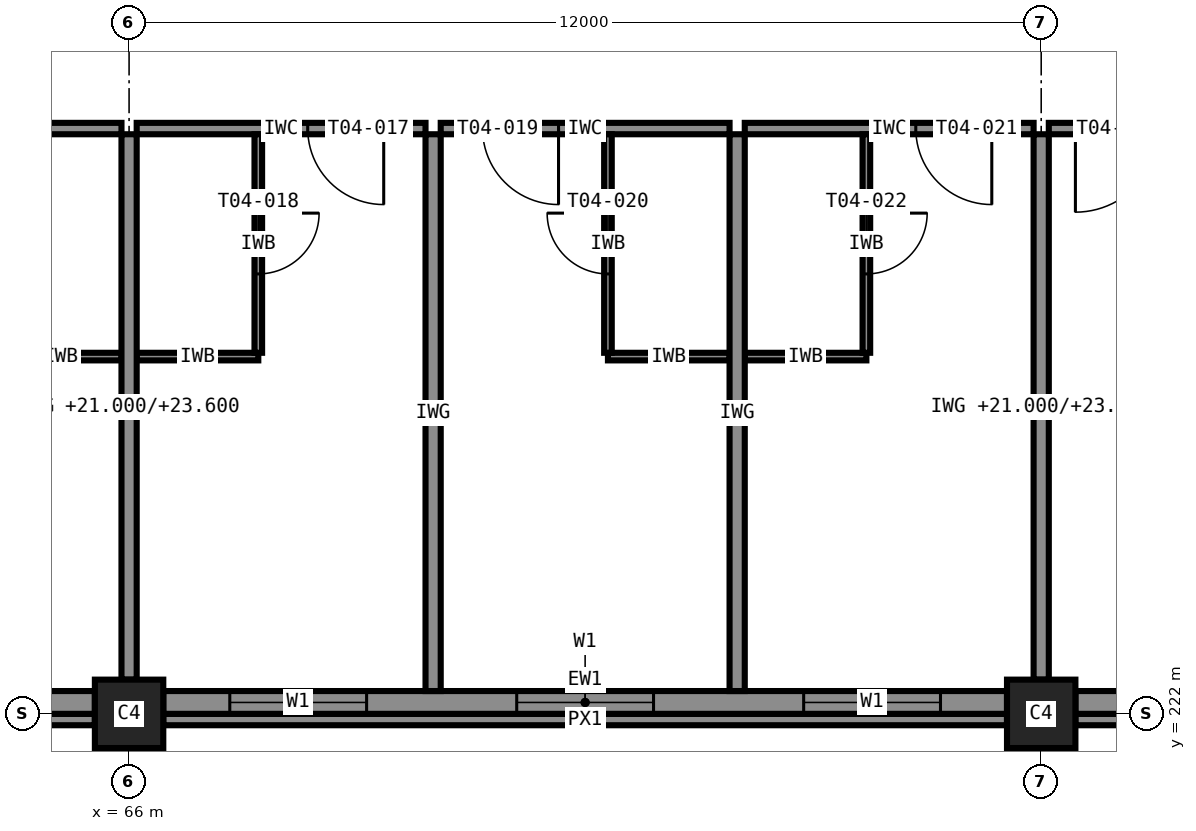
"""IFC4 building model, lengths in metres.
Left out: names, types, materials, properties, quantities, classifications, styles, units other than length and angle.
Written with IfcOpenShell. Run it as: python <this file> out.ifc"""

import sys

from ifc_helpers import new_model, si_unit, direction, frame, frame_2d, origin, origin_2d, place, context, subcontext, project, spatial, rectangle, extrude, element, fill, save


model = new_model("IFC4")
c1 = context("Model", 3, precision=1e-05, world=origin(), true_north=direction((0.0, 1.0)))
c2 = subcontext(c1, "Body", "Model", "MODEL_VIEW")
j1 = project(units=[si_unit("LENGTHUNIT", "METRE"), si_unit("PLANEANGLEUNIT", "RADIAN")], contexts=[c1])
p1 = place(None, origin())
s1 = spatial("IfcSite", under=j1, at=p1, CompositionType="ELEMENT")
p2 = place(p1, origin())
s2 = spatial("IfcBuilding", under=s1, at=p2, CompositionType="ELEMENT")
p3 = place(p2, frame((0.0, 0.0, 21.0)))
s3 = spatial("IfcBuildingStorey", under=s2, at=p3, CompositionType="ELEMENT", Elevation=21.0)
for number, where, z_axis, x_axis in (
    (1, (66.0, 222.0, 0.0), (0.0, 0.0, 1.0), (1.0, 0.0, 0.0)),
    (2, (78.0, 222.0, 0.0), (0.0, 0.0, 1.0), (1.0, 0.0, 0.0)),
):
    element("IfcColumn", number, at=place(p3, frame(where, z_axis=z_axis, x_axis=x_axis)), inside=s3, PredefinedType="COLUMN", context=c2, shape_type="SweptSolid", body=[
        extrude(rectangle(XDim=0.9, YDim=0.9, at=origin_2d()), origin(), (0.0, 0.0, 1.0), 3.6),
    ])
p4 = place(p3, frame((54.45, 222.15, 0.0), z_axis=(0.0, 0.0, 1.0), x_axis=(1.0, 0.0, 0.0)))
e3 = element("IfcWall", 3, at=p4, inside=s3, PredefinedType="STANDARD", context=c2, shape_type="SweptSolid", body=[
    extrude(rectangle(XDim=11.1, YDim=0.3, at=frame_2d((5.55, 0.0))), origin(), (0.0, 0.0, 1.0), 2.6),
])
p5 = place(p4, frame((0.875, 0.0, 0.85)))
e4 = element("IfcOpeningElement", 4, at=p5, cuts=e3, PredefinedType="OPENING", context=c2, shape_type="SweptSolid", body=[
    extrude(rectangle(XDim=1.8, YDim=1.75, at=frame_2d((0.9, 0.875))), frame((0.0, 0.16, 0.0), z_axis=(0.0, -1.0, 0.0), x_axis=(1.0, 0.0, 0.0)), (0.0, 0.0, 1.0), 0.32),
])
p6 = place(p4, frame((4.65, 0.0, 0.85)))
e5 = element("IfcOpeningElement", 5, at=p6, cuts=e3, PredefinedType="OPENING", context=c2, shape_type="SweptSolid", body=[
    extrude(rectangle(XDim=1.8, YDim=1.75, at=frame_2d((0.9, 0.875))), frame((0.0, 0.16, 0.0), z_axis=(0.0, -1.0, 0.0), x_axis=(1.0, 0.0, 0.0)), (0.0, 0.0, 1.0), 0.32),
])
p7 = place(p4, frame((8.425, 0.0, 0.85)))
e6 = element("IfcOpeningElement", 6, at=p7, cuts=e3, PredefinedType="OPENING", context=c2, shape_type="SweptSolid", body=[
    extrude(rectangle(XDim=1.8, YDim=1.75, at=frame_2d((0.9, 0.875))), frame((0.0, 0.16, 0.0), z_axis=(0.0, -1.0, 0.0), x_axis=(1.0, 0.0, 0.0)), (0.0, 0.0, 1.0), 0.32),
])
p8 = place(p3, frame((66.45, 222.15, 0.0), z_axis=(0.0, 0.0, 1.0), x_axis=(1.0, 0.0, 0.0)))
e7 = element("IfcWall", 7, at=p8, inside=s3, PredefinedType="STANDARD", context=c2, shape_type="SweptSolid", body=[
    extrude(rectangle(XDim=11.1, YDim=0.3, at=frame_2d((5.55, 0.0))), origin(), (0.0, 0.0, 1.0), 2.6),
])
p9 = place(p8, frame((0.875, 0.0, 0.85)))
e8 = element("IfcOpeningElement", 8, at=p9, cuts=e7, PredefinedType="OPENING", context=c2, shape_type="SweptSolid", body=[
    extrude(rectangle(XDim=1.8, YDim=1.75, at=frame_2d((0.9, 0.875))), frame((0.0, 0.16, 0.0), z_axis=(0.0, -1.0, 0.0), x_axis=(1.0, 0.0, 0.0)), (0.0, 0.0, 1.0), 0.32),
])
p10 = place(p8, frame((4.65, 0.0, 0.85)))
e9 = element("IfcOpeningElement", 9, at=p10, cuts=e7, PredefinedType="OPENING", context=c2, shape_type="SweptSolid", body=[
    extrude(rectangle(XDim=1.8, YDim=1.75, at=frame_2d((0.9, 0.875))), frame((0.0, 0.16, 0.0), z_axis=(0.0, -1.0, 0.0), x_axis=(1.0, 0.0, 0.0)), (0.0, 0.0, 1.0), 0.32),
])
p11 = place(p8, frame((8.425, 0.0, 0.85)))
e10 = element("IfcOpeningElement", 10, at=p11, cuts=e7, PredefinedType="OPENING", context=c2, shape_type="SweptSolid", body=[
    extrude(rectangle(XDim=1.8, YDim=1.75, at=frame_2d((0.9, 0.875))), frame((0.0, 0.16, 0.0), z_axis=(0.0, -1.0, 0.0), x_axis=(1.0, 0.0, 0.0)), (0.0, 0.0, 1.0), 0.32),
])
p12 = place(p3, frame((78.45, 222.15, 0.0), z_axis=(0.0, 0.0, 1.0), x_axis=(1.0, 0.0, 0.0)))
e11 = element("IfcWall", 11, at=p12, inside=s3, PredefinedType="STANDARD", context=c2, shape_type="SweptSolid", body=[
    extrude(rectangle(XDim=11.1, YDim=0.3, at=frame_2d((5.55, 0.0))), origin(), (0.0, 0.0, 1.0), 2.6),
])
p13 = place(p12, frame((1.075, 0.0, 0.85)))
e12 = element("IfcOpeningElement", 12, at=p13, cuts=e11, PredefinedType="OPENING", context=c2, shape_type="SweptSolid", body=[
    extrude(rectangle(XDim=1.8, YDim=1.75, at=frame_2d((0.9, 0.875))), frame((0.0, 0.16, 0.0), z_axis=(0.0, -1.0, 0.0), x_axis=(1.0, 0.0, 0.0)), (0.0, 0.0, 1.0), 0.32),
])
p14 = place(p12, frame((4.85, 0.0, 0.85)))
e13 = element("IfcOpeningElement", 13, at=p14, cuts=e11, PredefinedType="OPENING", context=c2, shape_type="SweptSolid", body=[
    extrude(rectangle(XDim=1.8, YDim=1.75, at=frame_2d((0.9, 0.875))), frame((0.0, 0.16, 0.0), z_axis=(0.0, -1.0, 0.0), x_axis=(1.0, 0.0, 0.0)), (0.0, 0.0, 1.0), 0.32),
])
for number, where, z_axis, x_axis in (
    (14, (54.45, 221.925, 3.4), (0.0, 0.0, 1.0), (1.0, 0.0, 0.0)),
    (15, (66.45, 221.925, 3.4), (0.0, 0.0, 1.0), (1.0, 0.0, 0.0)),
    (16, (78.45, 221.925, 3.4), (0.0, 0.0, 1.0), (1.0, 0.0, 0.0)),
):
    element("IfcWall", number, at=place(p3, frame(where, z_axis=z_axis, x_axis=x_axis)), inside=s3, PredefinedType="STANDARD", context=c2, shape_type="SweptSolid", body=[
        extrude(rectangle(XDim=11.1, YDim=0.15, at=frame_2d((5.55, 0.0))), origin(), (0.0, 0.0, 1.0), 0.2),
    ])
p15 = place(p3, frame((65.9, 229.7, 0.0), z_axis=(0.0, 0.0, 1.0), x_axis=(-1.0, 0.0, 0.0)))
e17 = element("IfcWall", 17, at=p15, inside=s3, PredefinedType="PARTITIONING", context=c2, shape_type="SweptSolid", body=[
    extrude(rectangle(XDim=3.8, YDim=0.15, at=frame_2d((1.9, 0.0))), origin(), (0.0, 0.0, 1.0), 3.4),
])
p16 = place(p15, frame((2.25, 0.0, 0.0)))
e18 = element("IfcOpeningElement", 18, at=p16, cuts=e17, PredefinedType="OPENING", context=c2, shape_type="SweptSolid", body=[
    extrude(rectangle(XDim=1.0, YDim=2.1, at=frame_2d((0.5, 1.05))), frame((0.0, 0.085, 0.0), z_axis=(0.0, -1.0, 0.0), x_axis=(1.0, 0.0, 0.0)), (0.0, 0.0, 1.0), 0.17),
])
p17 = place(p3, frame((64.3, 226.7, 0.0), z_axis=(0.0, 0.0, 1.0), x_axis=(1.0, 0.0, 0.0)))
e19 = element("IfcWall", 19, at=p17, inside=s3, PredefinedType="PARTITIONING", context=c2, shape_type="SweptSolid", body=[
    extrude(rectangle(XDim=1.6, YDim=0.1, at=frame_2d((0.8, 0.0))), origin(), (0.0, 0.0, 1.0), 3.4),
])
p18 = place(p3, frame((69.9, 229.7, 0.0), z_axis=(0.0, 0.0, 1.0), x_axis=(-1.0, 0.0, 0.0)))
e20 = element("IfcWall", 20, at=p18, inside=s3, PredefinedType="PARTITIONING", context=c2, shape_type="SweptSolid", body=[
    extrude(rectangle(XDim=3.8, YDim=0.15, at=frame_2d((1.9, 0.0))), origin(), (0.0, 0.0, 1.0), 3.4),
])
p19 = place(p18, frame((0.55, 0.0, 0.0)))
e21 = element("IfcOpeningElement", 21, at=p19, cuts=e20, PredefinedType="OPENING", context=c2, shape_type="SweptSolid", body=[
    extrude(rectangle(XDim=1.0, YDim=2.1, at=frame_2d((0.5, 1.05))), frame((0.0, 0.085, 0.0), z_axis=(0.0, -1.0, 0.0), x_axis=(1.0, 0.0, 0.0)), (0.0, 0.0, 1.0), 0.17),
])
p20 = place(p3, frame((66.1, 226.7, 0.0), z_axis=(0.0, 0.0, 1.0), x_axis=(1.0, 0.0, 0.0)))
e22 = element("IfcWall", 22, at=p20, inside=s3, PredefinedType="PARTITIONING", context=c2, shape_type="SweptSolid", body=[
    extrude(rectangle(XDim=1.6, YDim=0.1, at=frame_2d((0.8, 0.0))), origin(), (0.0, 0.0, 1.0), 3.4),
])
p21 = place(p3, frame((67.7, 229.625, 0.0), z_axis=(0.0, 0.0, 1.0), x_axis=(0.0, -1.0, 0.0)))
e23 = element("IfcWall", 23, at=p21, inside=s3, PredefinedType="PARTITIONING", context=c2, shape_type="SweptSolid", body=[
    extrude(rectangle(XDim=2.875, YDim=0.1, at=frame_2d((1.438, 0.0))), origin(), (0.0, 0.0, 1.0), 3.4),
])
p22 = place(p21, frame((1.038, 0.0, 0.0)))
e24 = element("IfcOpeningElement", 24, at=p22, cuts=e23, PredefinedType="OPENING", context=c2, shape_type="SweptSolid", body=[
    extrude(rectangle(XDim=0.8, YDim=2.1, at=frame_2d((0.4, 1.05))), frame((0.0, 0.06, 0.0), z_axis=(0.0, -1.0, 0.0), x_axis=(1.0, 0.0, 0.0)), (0.0, 0.0, 1.0), 0.12),
])
p23 = place(p3, frame((73.9, 229.7, 0.0), z_axis=(0.0, 0.0, 1.0), x_axis=(-1.0, 0.0, 0.0)))
e25 = element("IfcWall", 25, at=p23, inside=s3, PredefinedType="PARTITIONING", context=c2, shape_type="SweptSolid", body=[
    extrude(rectangle(XDim=3.8, YDim=0.15, at=frame_2d((1.9, 0.0))), origin(), (0.0, 0.0, 1.0), 3.4),
])
p24 = place(p23, frame((2.25, 0.0, 0.0)))
e26 = element("IfcOpeningElement", 26, at=p24, cuts=e25, PredefinedType="OPENING", context=c2, shape_type="SweptSolid", body=[
    extrude(rectangle(XDim=1.0, YDim=2.1, at=frame_2d((0.5, 1.05))), frame((0.0, 0.085, 0.0), z_axis=(0.0, -1.0, 0.0), x_axis=(1.0, 0.0, 0.0)), (0.0, 0.0, 1.0), 0.17),
])
p25 = place(p3, frame((72.3, 226.7, 0.0), z_axis=(0.0, 0.0, 1.0), x_axis=(1.0, 0.0, 0.0)))
e27 = element("IfcWall", 27, at=p25, inside=s3, PredefinedType="PARTITIONING", context=c2, shape_type="SweptSolid", body=[
    extrude(rectangle(XDim=1.6, YDim=0.1, at=frame_2d((0.8, 0.0))), origin(), (0.0, 0.0, 1.0), 3.4),
])
p26 = place(p3, frame((72.3, 226.75, 0.0), z_axis=(0.0, 0.0, 1.0), x_axis=(0.0, 1.0, 0.0)))
e28 = element("IfcWall", 28, at=p26, inside=s3, PredefinedType="PARTITIONING", context=c2, shape_type="SweptSolid", body=[
    extrude(rectangle(XDim=2.875, YDim=0.1, at=frame_2d((1.438, 0.0))), origin(), (0.0, 0.0, 1.0), 3.4),
])
p27 = place(p26, frame((1.038, 0.0, 0.0)))
e29 = element("IfcOpeningElement", 29, at=p27, cuts=e28, PredefinedType="OPENING", context=c2, shape_type="SweptSolid", body=[
    extrude(rectangle(XDim=0.8, YDim=2.1, at=frame_2d((0.4, 1.05))), frame((0.0, 0.06, 0.0), z_axis=(0.0, -1.0, 0.0), x_axis=(1.0, 0.0, 0.0)), (0.0, 0.0, 1.0), 0.12),
])
p28 = place(p3, frame((77.9, 229.7, 0.0), z_axis=(0.0, 0.0, 1.0), x_axis=(-1.0, 0.0, 0.0)))
e30 = element("IfcWall", 30, at=p28, inside=s3, PredefinedType="PARTITIONING", context=c2, shape_type="SweptSolid", body=[
    extrude(rectangle(XDim=3.8, YDim=0.15, at=frame_2d((1.9, 0.0))), origin(), (0.0, 0.0, 1.0), 3.4),
])
p29 = place(p28, frame((0.55, 0.0, 0.0)))
e31 = element("IfcOpeningElement", 31, at=p29, cuts=e30, PredefinedType="OPENING", context=c2, shape_type="SweptSolid", body=[
    extrude(rectangle(XDim=1.0, YDim=2.1, at=frame_2d((0.5, 1.05))), frame((0.0, 0.085, 0.0), z_axis=(0.0, -1.0, 0.0), x_axis=(1.0, 0.0, 0.0)), (0.0, 0.0, 1.0), 0.17),
])
p30 = place(p3, frame((74.1, 226.7, 0.0), z_axis=(0.0, 0.0, 1.0), x_axis=(1.0, 0.0, 0.0)))
e32 = element("IfcWall", 32, at=p30, inside=s3, PredefinedType="PARTITIONING", context=c2, shape_type="SweptSolid", body=[
    extrude(rectangle(XDim=1.6, YDim=0.1, at=frame_2d((0.8, 0.0))), origin(), (0.0, 0.0, 1.0), 3.4),
])
p31 = place(p3, frame((75.7, 229.625, 0.0), z_axis=(0.0, 0.0, 1.0), x_axis=(0.0, -1.0, 0.0)))
e33 = element("IfcWall", 33, at=p31, inside=s3, PredefinedType="PARTITIONING", context=c2, shape_type="SweptSolid", body=[
    extrude(rectangle(XDim=2.875, YDim=0.1, at=frame_2d((1.438, 0.0))), origin(), (0.0, 0.0, 1.0), 3.4),
])
p32 = place(p31, frame((1.038, 0.0, 0.0)))
e34 = element("IfcOpeningElement", 34, at=p32, cuts=e33, PredefinedType="OPENING", context=c2, shape_type="SweptSolid", body=[
    extrude(rectangle(XDim=0.8, YDim=2.1, at=frame_2d((0.4, 1.05))), frame((0.0, 0.06, 0.0), z_axis=(0.0, -1.0, 0.0), x_axis=(1.0, 0.0, 0.0)), (0.0, 0.0, 1.0), 0.12),
])
p33 = place(p3, frame((82.3, 229.7, 0.0), z_axis=(0.0, 0.0, 1.0), x_axis=(-1.0, 0.0, 0.0)))
e35 = element("IfcWall", 35, at=p33, inside=s3, PredefinedType="PARTITIONING", context=c2, shape_type="SweptSolid", body=[
    extrude(rectangle(XDim=4.2, YDim=0.15, at=frame_2d((2.1, 0.0))), origin(), (0.0, 0.0, 1.0), 3.4),
])
p34 = place(p33, frame((2.75, 0.0, 0.0)))
e36 = element("IfcOpeningElement", 36, at=p34, cuts=e35, PredefinedType="OPENING", context=c2, shape_type="SweptSolid", body=[
    extrude(rectangle(XDim=1.1, YDim=2.1, at=frame_2d((0.55, 1.05))), frame((0.0, 0.085, 0.0), z_axis=(0.0, -1.0, 0.0), x_axis=(1.0, 0.0, 0.0)), (0.0, 0.0, 1.0), 0.17),
])
p35 = place(p3, frame((66.0, 222.45, 0.0), z_axis=(0.0, 0.0, 1.0), x_axis=(0.0, 1.0, 0.0)))
e37 = element("IfcWall", 37, at=p35, inside=s3, PredefinedType="PARTITIONING", context=c2, shape_type="SweptSolid", body=[
    extrude(rectangle(XDim=7.175, YDim=0.2, at=frame_2d((3.587, 0.0))), origin(), (0.0, 0.0, 1.0), 2.6),
])
for number, where, z_axis, x_axis in (
    (38, (70.0, 222.3, 0.0), (0.0, 0.0, 1.0), (0.0, 1.0, 0.0)),
    (39, (74.0, 222.3, 0.0), (0.0, 0.0, 1.0), (0.0, 1.0, 0.0)),
):
    element("IfcWall", number, at=place(p3, frame(where, z_axis=z_axis, x_axis=x_axis)), inside=s3, PredefinedType="PARTITIONING", context=c2, shape_type="SweptSolid", body=[
        extrude(rectangle(XDim=7.325, YDim=0.2, at=frame_2d((3.663, 0.0))), origin(), (0.0, 0.0, 1.0), 3.4),
    ])
p36 = place(p3, frame((78.0, 222.45, 0.0), z_axis=(0.0, 0.0, 1.0), x_axis=(0.0, 1.0, 0.0)))
e40 = element("IfcWall", 40, at=p36, inside=s3, PredefinedType="PARTITIONING", context=c2, shape_type="SweptSolid", body=[
    extrude(rectangle(XDim=7.175, YDim=0.2, at=frame_2d((3.587, 0.0))), origin(), (0.0, 0.0, 1.0), 2.6),
])
p37 = place(p9, origin())
e41 = element("IfcWindow", 41, at=p37, inside=s3, PartitioningType="SINGLE_PANEL", PredefinedType="WINDOW", context=c2, shape_type="SweptSolid", body=[
    extrude(rectangle(XDim=1.8, YDim=1.75, at=frame_2d((0.9, 0.875))), frame((0.0, 0.03, 0.0), z_axis=(0.0, -1.0, 0.0), x_axis=(1.0, 0.0, 0.0)), (0.0, 0.0, 1.0), 0.06),
])
fill(e8, e41)
p38 = place(p10, origin())
e42 = element("IfcWindow", 42, at=p38, inside=s3, PartitioningType="SINGLE_PANEL", PredefinedType="WINDOW", context=c2, shape_type="SweptSolid", body=[
    extrude(rectangle(XDim=1.8, YDim=1.75, at=frame_2d((0.9, 0.875))), frame((0.0, 0.03, 0.0), z_axis=(0.0, -1.0, 0.0), x_axis=(1.0, 0.0, 0.0)), (0.0, 0.0, 1.0), 0.06),
])
fill(e9, e42)
p39 = place(p11, origin())
e43 = element("IfcWindow", 43, at=p39, inside=s3, PartitioningType="SINGLE_PANEL", PredefinedType="WINDOW", context=c2, shape_type="SweptSolid", body=[
    extrude(rectangle(XDim=1.8, YDim=1.75, at=frame_2d((0.9, 0.875))), frame((0.0, 0.03, 0.0), z_axis=(0.0, -1.0, 0.0), x_axis=(1.0, 0.0, 0.0)), (0.0, 0.0, 1.0), 0.06),
])
fill(e10, e43)
p40 = place(p19, origin())
e44 = element("IfcDoor", 44, at=p40, inside=s3, OperationType="SINGLE_SWING_LEFT", PredefinedType="DOOR", context=c2, shape_type="SweptSolid", body=[
    extrude(rectangle(XDim=1.0, YDim=2.1, at=frame_2d((0.5, 1.05))), frame((0.0, 0.025, 0.0), z_axis=(0.0, -1.0, 0.0), x_axis=(1.0, 0.0, 0.0)), (0.0, 0.0, 1.0), 0.05),
])
fill(e21, e44)
p41 = place(p22, origin())
e45 = element("IfcDoor", 45, at=p41, inside=s3, OperationType="SINGLE_SWING_LEFT", PredefinedType="DOOR", context=c2, shape_type="SweptSolid", body=[
    extrude(rectangle(XDim=0.8, YDim=2.1, at=frame_2d((0.4, 1.05))), frame((0.0, 0.025, 0.0), z_axis=(0.0, -1.0, 0.0), x_axis=(1.0, 0.0, 0.0)), (0.0, 0.0, 1.0), 0.05),
])
fill(e24, e45)
p42 = place(p24, origin())
e46 = element("IfcDoor", 46, at=p42, inside=s3, OperationType="SINGLE_SWING_LEFT", PredefinedType="DOOR", context=c2, shape_type="SweptSolid", body=[
    extrude(rectangle(XDim=1.0, YDim=2.1, at=frame_2d((0.5, 1.05))), frame((0.0, 0.025, 0.0), z_axis=(0.0, -1.0, 0.0), x_axis=(1.0, 0.0, 0.0)), (0.0, 0.0, 1.0), 0.05),
])
fill(e26, e46)
p43 = place(p27, origin())
e47 = element("IfcDoor", 47, at=p43, inside=s3, OperationType="SINGLE_SWING_RIGHT", PredefinedType="DOOR", context=c2, shape_type="SweptSolid", body=[
    extrude(rectangle(XDim=0.8, YDim=2.1, at=frame_2d((0.4, 1.05))), frame((0.0, 0.025, 0.0), z_axis=(0.0, -1.0, 0.0), x_axis=(1.0, 0.0, 0.0)), (0.0, 0.0, 1.0), 0.05),
])
fill(e29, e47)
p44 = place(p29, origin())
e48 = element("IfcDoor", 48, at=p44, inside=s3, OperationType="SINGLE_SWING_LEFT", PredefinedType="DOOR", context=c2, shape_type="SweptSolid", body=[
    extrude(rectangle(XDim=1.0, YDim=2.1, at=frame_2d((0.5, 1.05))), frame((0.0, 0.025, 0.0), z_axis=(0.0, -1.0, 0.0), x_axis=(1.0, 0.0, 0.0)), (0.0, 0.0, 1.0), 0.05),
])
fill(e31, e48)
p45 = place(p32, origin())
e49 = element("IfcDoor", 49, at=p45, inside=s3, OperationType="SINGLE_SWING_LEFT", PredefinedType="DOOR", context=c2, shape_type="SweptSolid", body=[
    extrude(rectangle(XDim=0.8, YDim=2.1, at=frame_2d((0.4, 1.05))), frame((0.0, 0.025, 0.0), z_axis=(0.0, -1.0, 0.0), x_axis=(1.0, 0.0, 0.0)), (0.0, 0.0, 1.0), 0.05),
])
fill(e34, e49)
p46 = place(p34, origin())
e50 = element("IfcDoor", 50, at=p46, inside=s3, OperationType="SINGLE_SWING_RIGHT", PredefinedType="DOOR", context=c2, shape_type="SweptSolid", body=[
    extrude(rectangle(XDim=1.1, YDim=2.1, at=frame_2d((0.55, 1.05))), frame((0.0, 0.025, 0.0), z_axis=(0.0, -1.0, 0.0), x_axis=(1.0, 0.0, 0.0)), (0.0, 0.0, 1.0), 0.05),
])
fill(e36, e50)
save(model, sys.argv[1])
